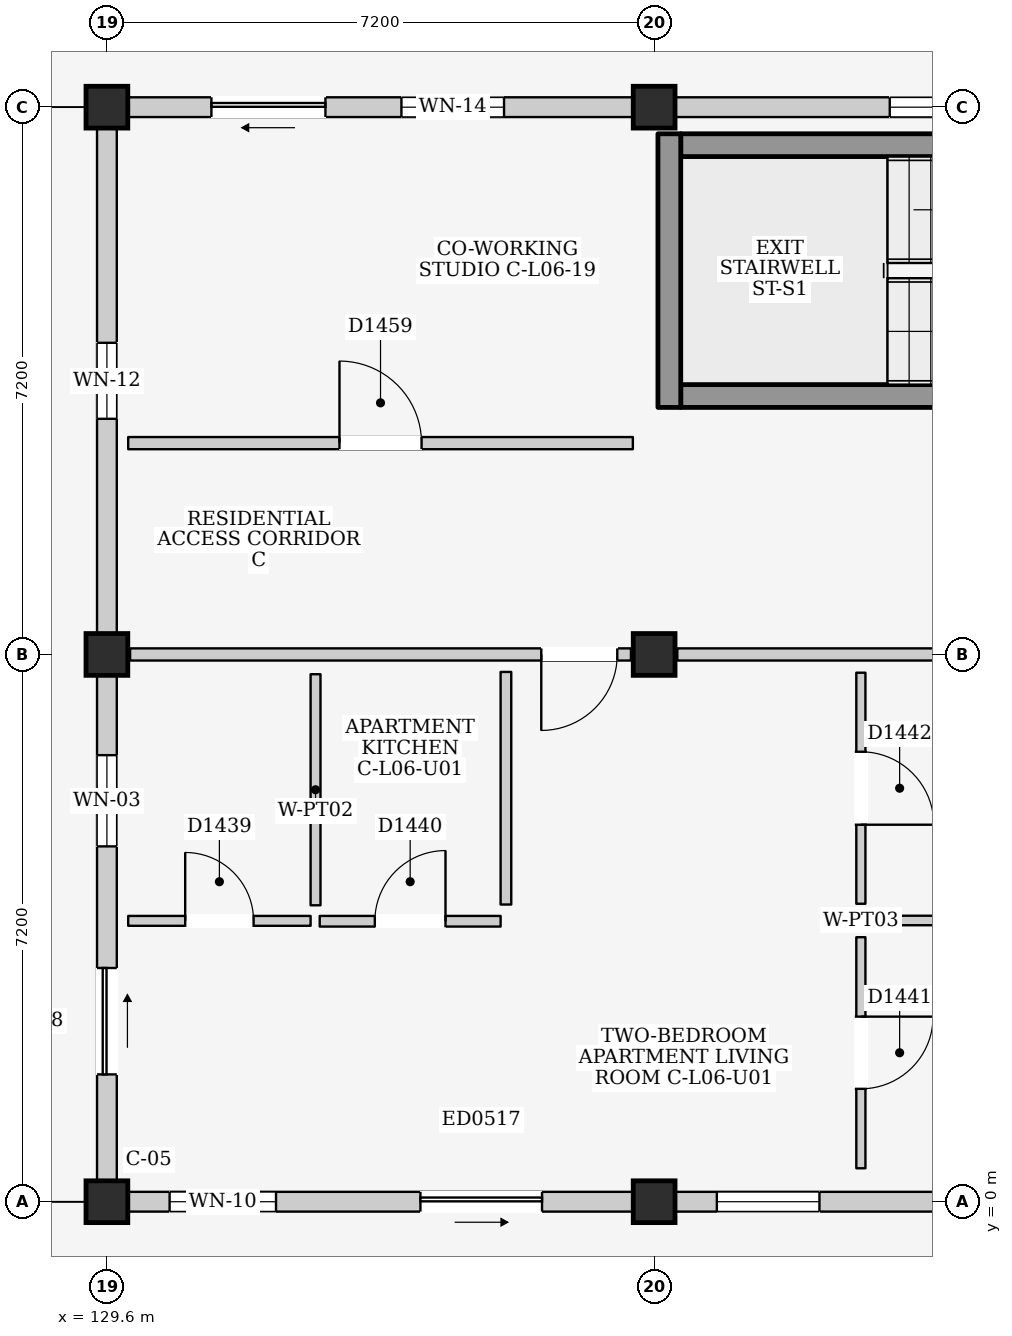
"""IFC4 building model, lengths in metres.
Left out: names, types, materials, properties, quantities, classifications, styles, units other than length and angle.
Written with IfcOpenShell. Run it as: python <this file> out.ifc"""

import sys

from ifc_helpers import new_model, si_unit, direction, frame, frame_2d, origin, origin_2d, place, context, subcontext, project, spatial, rectangle, extrude, element, fill, save


model = new_model("IFC4")
c1 = context("Model", 3, precision=1e-05, world=origin(), true_north=direction((0.0, 1.0)))
c2 = subcontext(c1, "Body", "Model", "MODEL_VIEW")
j1 = project(units=[si_unit("LENGTHUNIT", "METRE"), si_unit("PLANEANGLEUNIT", "RADIAN")], contexts=[c1])
p1 = place(None, origin())
s1 = spatial("IfcSite", under=j1, at=p1, CompositionType="ELEMENT")
p2 = place(p1, origin())
s2 = spatial("IfcBuilding", under=s1, at=p2, CompositionType="ELEMENT")
p3 = place(p2, frame((0.0, 0.0, 21.9)))
s3 = spatial("IfcBuildingStorey", under=s2, at=p3, CompositionType="ELEMENT", Elevation=21.9)
for number, where, z_axis, x_axis in (
    (1, (129.6, 0.0, 0.0), (0.0, 0.0, 1.0), (1.0, 0.0, 0.0)),
    (2, (129.6, 7.2, 0.0), (0.0, 0.0, 1.0), (1.0, 0.0, 0.0)),
    (3, (129.6, 14.4, 0.0), (0.0, 0.0, 1.0), (1.0, 0.0, 0.0)),
    (4, (136.8, 0.0, 0.0), (0.0, 0.0, 1.0), (1.0, 0.0, 0.0)),
    (5, (136.8, 7.2, 0.0), (0.0, 0.0, 1.0), (1.0, 0.0, 0.0)),
    (6, (136.8, 14.4, 0.0), (0.0, 0.0, 1.0), (1.0, 0.0, 0.0)),
):
    element("IfcColumn", number, at=place(p3, frame(where, z_axis=z_axis, x_axis=x_axis)), inside=s3, PredefinedType="COLUMN", context=c2, shape_type="SweptSolid", body=[
        extrude(rectangle(XDim=0.55, YDim=0.55, at=origin_2d()), origin(), (0.0, 0.0, 1.0), 3.2),
    ])
p4 = place(p3, frame((129.875, 0.0, 0.0), z_axis=(0.0, 0.0, 1.0), x_axis=(1.0, 0.0, 0.0)))
e7 = element("IfcWall", 7, at=p4, inside=s3, PredefinedType="ELEMENTEDWALL", context=c2, shape_type="SweptSolid", body=[
    extrude(rectangle(XDim=6.65, YDim=0.26, at=frame_2d((3.325, 0.0))), origin(), (0.0, 0.0, 1.0), 2.515),
])
p5 = place(p4, frame((3.85, 0.0, 0.0)))
e8 = element("IfcOpeningElement", 8, at=p5, cuts=e7, PredefinedType="OPENING", context=c2, shape_type="SweptSolid", body=[
    extrude(rectangle(XDim=1.6, YDim=2.12, at=frame_2d((0.8, 1.06))), frame((0.0, 0.145, 0.0), z_axis=(0.0, -1.0, 0.0), x_axis=(1.0, 0.0, 0.0)), (0.0, 0.0, 1.0), 0.29),
])
p6 = place(p4, frame((0.55, 0.0, 0.9)))
e9 = element("IfcOpeningElement", 9, at=p6, cuts=e7, PredefinedType="OPENING", context=c2, shape_type="SweptSolid", body=[
    extrude(rectangle(XDim=1.4, YDim=1.2, at=frame_2d((0.7, 0.6))), frame((0.0, 0.145, 0.0), z_axis=(0.0, -1.0, 0.0), x_axis=(1.0, 0.0, 0.0)), (0.0, 0.0, 1.0), 0.29),
])
p7 = place(p3, frame((129.6, 0.275, 0.0), z_axis=(0.0, 0.0, 1.0), x_axis=(0.0, 1.0, 0.0)))
e10 = element("IfcWall", 10, at=p7, inside=s3, PredefinedType="ELEMENTEDWALL", context=c2, shape_type="SweptSolid", body=[
    extrude(rectangle(XDim=6.65, YDim=0.26, at=frame_2d((3.325, 0.0))), origin(), (0.0, 0.0, 1.0), 2.465),
])
p8 = place(p7, frame((1.4, 0.0, 0.0)))
e11 = element("IfcOpeningElement", 11, at=p8, cuts=e10, PredefinedType="OPENING", context=c2, shape_type="SweptSolid", body=[
    extrude(rectangle(XDim=1.4, YDim=2.1, at=frame_2d((0.7, 1.05))), frame((0.0, 0.145, 0.0), z_axis=(0.0, -1.0, 0.0), x_axis=(1.0, 0.0, 0.0)), (0.0, 0.0, 1.0), 0.29),
])
p9 = place(p7, frame((4.4, 0.0, 0.95)))
e12 = element("IfcOpeningElement", 12, at=p9, cuts=e10, PredefinedType="OPENING", context=c2, shape_type="SweptSolid", body=[
    extrude(rectangle(XDim=1.2, YDim=1.35, at=frame_2d((0.6, 0.675))), frame((0.0, 0.145, 0.0), z_axis=(0.0, -1.0, 0.0), x_axis=(1.0, 0.0, 0.0)), (0.0, 0.0, 1.0), 0.29),
])
p10 = place(p3, frame((129.875, 14.4, 0.0), z_axis=(0.0, 0.0, 1.0), x_axis=(1.0, 0.0, 0.0)))
e13 = element("IfcWall", 13, at=p10, inside=s3, PredefinedType="ELEMENTEDWALL", context=c2, shape_type="SweptSolid", body=[
    extrude(rectangle(XDim=6.65, YDim=0.26, at=frame_2d((3.325, 0.0))), origin(), (0.0, 0.0, 1.0), 2.365),
])
p11 = place(p10, frame((1.1, 0.0, 0.0)))
e14 = element("IfcOpeningElement", 14, at=p11, cuts=e13, PredefinedType="OPENING", context=c2, shape_type="SweptSolid", body=[
    extrude(rectangle(XDim=1.5, YDim=2.12, at=frame_2d((0.75, 1.06))), frame((0.0, 0.145, 0.0), z_axis=(0.0, -1.0, 0.0), x_axis=(1.0, 0.0, 0.0)), (0.0, 0.0, 1.0), 0.29),
])
p12 = place(p10, frame((3.6, 0.0, 0.755)))
e15 = element("IfcOpeningElement", 15, at=p12, cuts=e13, PredefinedType="OPENING", context=c2, shape_type="SweptSolid", body=[
    extrude(rectangle(XDim=1.35, YDim=1.5, at=frame_2d((0.675, 0.75))), frame((0.0, 0.145, 0.0), z_axis=(0.0, -1.0, 0.0), x_axis=(1.0, 0.0, 0.0)), (0.0, 0.0, 1.0), 0.29),
])
p13 = place(p3, frame((129.6, 7.475, 0.0), z_axis=(0.0, 0.0, 1.0), x_axis=(0.0, 1.0, 0.0)))
e16 = element("IfcWall", 16, at=p13, inside=s3, PredefinedType="ELEMENTEDWALL", context=c2, shape_type="SweptSolid", body=[
    extrude(rectangle(XDim=6.65, YDim=0.26, at=frame_2d((3.325, 0.0))), origin(), (0.0, 0.0, 1.0), 2.465),
])
p14 = place(p13, frame((2.825, 0.0, 1.1)))
e17 = element("IfcOpeningElement", 17, at=p14, cuts=e16, PredefinedType="OPENING", context=c2, shape_type="SweptSolid", body=[
    extrude(rectangle(XDim=1.0, YDim=0.9, at=frame_2d((0.5, 0.45))), frame((0.0, 0.145, 0.0), z_axis=(0.0, -1.0, 0.0), x_axis=(1.0, 0.0, 0.0)), (0.0, 0.0, 1.0), 0.29),
])
p15 = place(p3, frame((137.075, 0.0, 0.0), z_axis=(0.0, 0.0, 1.0), x_axis=(1.0, 0.0, 0.0)))
e18 = element("IfcWall", 18, at=p15, inside=s3, PredefinedType="ELEMENTEDWALL", context=c2, shape_type="SweptSolid", body=[
    extrude(rectangle(XDim=6.65, YDim=0.26, at=frame_2d((3.325, 0.0))), origin(), (0.0, 0.0, 1.0), 2.515),
])
p16 = place(p15, frame((3.85, 0.0, 0.0)))
e19 = element("IfcOpeningElement", 19, at=p16, cuts=e18, PredefinedType="OPENING", context=c2, shape_type="SweptSolid", body=[
    extrude(rectangle(XDim=1.5, YDim=2.12, at=frame_2d((0.75, 1.06))), frame((0.0, 0.145, 0.0), z_axis=(0.0, -1.0, 0.0), x_axis=(1.0, 0.0, 0.0)), (0.0, 0.0, 1.0), 0.29),
])
p17 = place(p15, frame((0.55, 0.0, 0.9)))
e20 = element("IfcOpeningElement", 20, at=p17, cuts=e18, PredefinedType="OPENING", context=c2, shape_type="SweptSolid", body=[
    extrude(rectangle(XDim=1.35, YDim=1.5, at=frame_2d((0.675, 0.75))), frame((0.0, 0.145, 0.0), z_axis=(0.0, -1.0, 0.0), x_axis=(1.0, 0.0, 0.0)), (0.0, 0.0, 1.0), 0.29),
])
p18 = place(p3, frame((137.075, 14.4, 0.0), z_axis=(0.0, 0.0, 1.0), x_axis=(1.0, 0.0, 0.0)))
e21 = element("IfcWall", 21, at=p18, inside=s3, PredefinedType="ELEMENTEDWALL", context=c2, shape_type="SweptSolid", body=[
    extrude(rectangle(XDim=6.65, YDim=0.26, at=frame_2d((3.325, 0.0))), origin(), (0.0, 0.0, 1.0), 2.365),
])
p19 = place(p18, frame((2.825, 0.0, 1.2)))
e22 = element("IfcOpeningElement", 22, at=p19, cuts=e21, PredefinedType="OPENING", context=c2, shape_type="SweptSolid", body=[
    extrude(rectangle(XDim=1.0, YDim=0.9, at=frame_2d((0.5, 0.45))), frame((0.0, 0.145, 0.0), z_axis=(0.0, -1.0, 0.0), x_axis=(1.0, 0.0, 0.0)), (0.0, 0.0, 1.0), 0.29),
])
p20 = place(p3, frame((137.15, 10.6, 0.0), z_axis=(0.0, 0.0, 1.0), x_axis=(1.0, 0.0, 0.0)))
e23 = element("IfcWall", 23, at=p20, inside=s3, PredefinedType="SHEAR", context=c2, shape_type="SweptSolid", body=[
    extrude(rectangle(XDim=6.5, YDim=0.3, at=frame_2d((3.25, 0.0))), origin(), (0.0, 0.0, 1.0), 2.98),
])
p21 = place(p20, frame((5.17, 0.0, 0.0)))
e24 = element("IfcOpeningElement", 24, at=p21, cuts=e23, PredefinedType="OPENING", context=c2, shape_type="SweptSolid", body=[
    extrude(rectangle(XDim=1.15, YDim=2.2, at=frame_2d((0.575, 1.1))), frame((0.0, 0.165, 0.0), z_axis=(0.0, -1.0, 0.0), x_axis=(1.0, 0.0, 0.0)), (0.0, 0.0, 1.0), 0.33),
])
p22 = place(p3, frame((137.15, 13.9, 0.0), z_axis=(0.0, 0.0, 1.0), x_axis=(1.0, 0.0, 0.0)))
e25 = element("IfcWall", 25, at=p22, inside=s3, PredefinedType="SHEAR", context=c2, shape_type="SweptSolid", body=[
    extrude(rectangle(XDim=6.5, YDim=0.3, at=frame_2d((3.25, 0.0))), origin(), (0.0, 0.0, 1.0), 2.98),
])
p23 = place(p3, frame((137.0, 10.45, 0.0), z_axis=(0.0, 0.0, 1.0), x_axis=(0.0, 1.0, 0.0)))
e26 = element("IfcWall", 26, at=p23, inside=s3, PredefinedType="SHEAR", context=c2, shape_type="SweptSolid", body=[
    extrude(rectangle(XDim=3.6, YDim=0.3, at=frame_2d((1.8, 0.0))), origin(), (0.0, 0.0, 1.0), 2.98),
])
p24 = place(p3, frame((129.905, 7.2, 0.0), z_axis=(0.0, 0.0, 1.0), x_axis=(1.0, 0.0, 0.0)))
e27 = element("IfcWall", 27, at=p24, inside=s3, PredefinedType="PARTITIONING", context=c2, shape_type="SweptSolid", body=[
    extrude(rectangle(XDim=6.59, YDim=0.16, at=frame_2d((3.295, 0.0))), origin(), (0.0, 0.0, 1.0), 2.365),
])
p25 = place(p24, frame((5.41, 0.0, 0.0)))
e28 = element("IfcOpeningElement", 28, at=p25, cuts=e27, PredefinedType="OPENING", context=c2, shape_type="SweptSolid", body=[
    extrude(rectangle(XDim=1.0, YDim=2.15, at=frame_2d((0.5, 1.075))), frame((0.0, 0.095, 0.0), z_axis=(0.0, -1.0, 0.0), x_axis=(1.0, 0.0, 0.0)), (0.0, 0.0, 1.0), 0.19),
])
p26 = place(p3, frame((137.105, 7.2, 0.0), z_axis=(0.0, 0.0, 1.0), x_axis=(1.0, 0.0, 0.0)))
e29 = element("IfcWall", 29, at=p26, inside=s3, PredefinedType="PARTITIONING", context=c2, shape_type="SweptSolid", body=[
    extrude(rectangle(XDim=6.59, YDim=0.16, at=frame_2d((3.295, 0.0))), origin(), (0.0, 0.0, 1.0), 2.365),
])
p27 = place(p3, frame((129.88, 3.695, 0.0), z_axis=(0.0, 0.0, 1.0), x_axis=(1.0, 0.0, 0.0)))
e30 = element("IfcWall", 30, at=p27, inside=s3, PredefinedType="PARTITIONING", context=c2, shape_type="SweptSolid", body=[
    extrude(rectangle(XDim=2.4, YDim=0.13, at=frame_2d((1.2, 0.0))), origin(), (0.0, 0.0, 1.0), 2.98),
])
p28 = place(p27, frame((0.75, 0.0, 0.0)))
e31 = element("IfcOpeningElement", 31, at=p28, cuts=e30, PredefinedType="OPENING", context=c2, shape_type="SweptSolid", body=[
    extrude(rectangle(XDim=0.9, YDim=2.1, at=frame_2d((0.45, 1.05))), frame((0.0, 0.08, 0.0), z_axis=(0.0, -1.0, 0.0), x_axis=(1.0, 0.0, 0.0)), (0.0, 0.0, 1.0), 0.16),
])
p29 = place(p3, frame((132.345, 3.9, 0.0), z_axis=(0.0, 0.0, 1.0), x_axis=(0.0, 1.0, 0.0)))
e32 = element("IfcWall", 32, at=p29, inside=s3, PredefinedType="PARTITIONING", context=c2, shape_type="SweptSolid", body=[
    extrude(rectangle(XDim=3.04, YDim=0.13, at=frame_2d((1.52, 0.0))), origin(), (0.0, 0.0, 1.0), 2.98),
])
p30 = place(p3, frame((132.4, 3.69, 0.0), z_axis=(0.0, 0.0, 1.0), x_axis=(1.0, 0.0, 0.0)))
e33 = element("IfcWall", 33, at=p30, inside=s3, PredefinedType="PARTITIONING", context=c2, shape_type="SweptSolid", body=[
    extrude(rectangle(XDim=2.38, YDim=0.14, at=frame_2d((1.19, 0.0))), origin(), (0.0, 0.0, 1.0), 2.98),
])
p31 = place(p30, frame((0.725, 0.0, 0.0)))
e34 = element("IfcOpeningElement", 34, at=p31, cuts=e33, PredefinedType="OPENING", context=c2, shape_type="SweptSolid", body=[
    extrude(rectangle(XDim=0.93, YDim=2.14, at=frame_2d((0.465, 1.07))), frame((0.0, 0.085, 0.0), z_axis=(0.0, -1.0, 0.0), x_axis=(1.0, 0.0, 0.0)), (0.0, 0.0, 1.0), 0.17),
])
p32 = place(p3, frame((134.85, 3.91, 0.0), z_axis=(0.0, 0.0, 1.0), x_axis=(0.0, 1.0, 0.0)))
e35 = element("IfcWall", 35, at=p32, inside=s3, PredefinedType="PARTITIONING", context=c2, shape_type="SweptSolid", body=[
    extrude(rectangle(XDim=3.06, YDim=0.14, at=frame_2d((1.53, 0.0))), origin(), (0.0, 0.0, 1.0), 2.98),
])
p33 = place(p3, frame((139.52, 0.44, 0.0), z_axis=(0.0, 0.0, 1.0), x_axis=(0.0, 1.0, 0.0)))
e36 = element("IfcWall", 36, at=p33, inside=s3, PredefinedType="PARTITIONING", context=c2, shape_type="SweptSolid", body=[
    extrude(rectangle(XDim=3.04, YDim=0.12, at=frame_2d((1.52, 0.0))), origin(), (0.0, 0.0, 1.0), 2.98),
])
p34 = place(p33, frame((1.045, 0.0, 0.0)))
e37 = element("IfcOpeningElement", 37, at=p34, cuts=e36, PredefinedType="OPENING", context=c2, shape_type="SweptSolid", body=[
    extrude(rectangle(XDim=0.95, YDim=2.15, at=frame_2d((0.475, 1.075))), frame((0.0, 0.075, 0.0), z_axis=(0.0, -1.0, 0.0), x_axis=(1.0, 0.0, 0.0)), (0.0, 0.0, 1.0), 0.15),
])
p35 = place(p3, frame((139.72, 3.7, 0.0), z_axis=(0.0, 0.0, 1.0), x_axis=(1.0, 0.0, 0.0)))
e38 = element("IfcWall", 38, at=p35, inside=s3, PredefinedType="PARTITIONING", context=c2, shape_type="SweptSolid", body=[
    extrude(rectangle(XDim=4.06, YDim=0.125, at=frame_2d((2.03, 0.0))), origin(), (0.0, 0.0, 1.0), 2.98),
])
p36 = place(p3, frame((139.52, 3.92, 0.0), z_axis=(0.0, 0.0, 1.0), x_axis=(0.0, 1.0, 0.0)))
e39 = element("IfcWall", 39, at=p36, inside=s3, PredefinedType="PARTITIONING", context=c2, shape_type="SweptSolid", body=[
    extrude(rectangle(XDim=3.04, YDim=0.12, at=frame_2d((1.52, 0.0))), origin(), (0.0, 0.0, 1.0), 2.98),
])
p37 = place(p36, frame((1.04, 0.0, 0.0)))
e40 = element("IfcOpeningElement", 40, at=p37, cuts=e39, PredefinedType="OPENING", context=c2, shape_type="SweptSolid", body=[
    extrude(rectangle(XDim=0.96, YDim=2.15, at=frame_2d((0.48, 1.075))), frame((0.0, 0.075, 0.0), z_axis=(0.0, -1.0, 0.0), x_axis=(1.0, 0.0, 0.0)), (0.0, 0.0, 1.0), 0.15),
])
p38 = place(p3, frame((129.88, 9.98, 0.0), z_axis=(0.0, 0.0, 1.0), x_axis=(1.0, 0.0, 0.0)))
e41 = element("IfcWall", 41, at=p38, inside=s3, PredefinedType="PARTITIONING", context=c2, shape_type="SweptSolid", body=[
    extrude(rectangle(XDim=6.64, YDim=0.16, at=frame_2d((3.32, 0.0))), origin(), (0.0, 0.0, 1.0), 2.98),
])
p39 = place(p38, frame((2.78, 0.0, 0.0)))
e42 = element("IfcOpeningElement", 42, at=p39, cuts=e41, PredefinedType="OPENING", context=c2, shape_type="SweptSolid", body=[
    extrude(rectangle(XDim=1.08, YDim=2.22, at=frame_2d((0.54, 1.11))), frame((0.0, 0.095, 0.0), z_axis=(0.0, -1.0, 0.0), x_axis=(1.0, 0.0, 0.0)), (0.0, 0.0, 1.0), 0.19),
])
p40 = place(p5, frame((1.6, 0.0, 0.0), z_axis=(0.0, 0.0, 1.0), x_axis=(-1.0, 0.0, 0.0)))
e43 = element("IfcDoor", 43, at=p40, inside=s3, OperationType="SLIDING_TO_RIGHT", PredefinedType="DOOR", context=c2, shape_type="SweptSolid", body=[
    extrude(rectangle(XDim=1.6, YDim=2.12, at=frame_2d((0.8, 1.06))), frame((0.0, 0.025, 0.0), z_axis=(0.0, -1.0, 0.0), x_axis=(1.0, 0.0, 0.0)), (0.0, 0.0, 1.0), 0.05),
])
fill(e8, e43)
p41 = place(p6, origin())
e44 = element("IfcWindow", 44, at=p41, inside=s3, PartitioningType="DOUBLE_PANEL_HORIZONTAL", PredefinedType="WINDOW", context=c2, shape_type="SweptSolid", body=[
    extrude(rectangle(XDim=1.4, YDim=1.2, at=frame_2d((0.7, 0.6))), frame((0.0, 0.03, 0.0), z_axis=(0.0, -1.0, 0.0), x_axis=(1.0, 0.0, 0.0)), (0.0, 0.0, 1.0), 0.06),
])
fill(e9, e44)
p42 = place(p8, frame((1.4, 0.0, 0.0), z_axis=(0.0, 0.0, 1.0), x_axis=(-1.0, 0.0, 0.0)))
e45 = element("IfcDoor", 45, at=p42, inside=s3, OperationType="SLIDING_TO_RIGHT", PredefinedType="DOOR", context=c2, shape_type="SweptSolid", body=[
    extrude(rectangle(XDim=1.4, YDim=2.1, at=frame_2d((0.7, 1.05))), frame((0.0, 0.025, 0.0), z_axis=(0.0, -1.0, 0.0), x_axis=(1.0, 0.0, 0.0)), (0.0, 0.0, 1.0), 0.05),
])
fill(e11, e45)
p43 = place(p9, origin())
e46 = element("IfcWindow", 46, at=p43, inside=s3, PartitioningType="SINGLE_PANEL", PredefinedType="WINDOW", context=c2, shape_type="SweptSolid", body=[
    extrude(rectangle(XDim=1.2, YDim=1.35, at=frame_2d((0.6, 0.675))), frame((0.0, 0.03, 0.0), z_axis=(0.0, -1.0, 0.0), x_axis=(1.0, 0.0, 0.0)), (0.0, 0.0, 1.0), 0.06),
])
fill(e12, e46)
p44 = place(p11, frame((1.5, 0.0, 0.0), z_axis=(0.0, 0.0, 1.0), x_axis=(-1.0, 0.0, 0.0)))
e47 = element("IfcDoor", 47, at=p44, inside=s3, OperationType="SLIDING_TO_LEFT", PredefinedType="DOOR", context=c2, shape_type="SweptSolid", body=[
    extrude(rectangle(XDim=1.5, YDim=2.12, at=frame_2d((0.75, 1.06))), frame((0.0, 0.025, 0.0), z_axis=(0.0, -1.0, 0.0), x_axis=(1.0, 0.0, 0.0)), (0.0, 0.0, 1.0), 0.05),
])
fill(e14, e47)
p45 = place(p12, origin())
e48 = element("IfcWindow", 48, at=p45, inside=s3, PartitioningType="SINGLE_PANEL", PredefinedType="WINDOW", context=c2, shape_type="SweptSolid", body=[
    extrude(rectangle(XDim=1.35, YDim=1.5, at=frame_2d((0.675, 0.75))), frame((0.0, 0.03, 0.0), z_axis=(0.0, -1.0, 0.0), x_axis=(1.0, 0.0, 0.0)), (0.0, 0.0, 1.0), 0.06),
])
fill(e15, e48)
p46 = place(p14, origin())
e49 = element("IfcWindow", 49, at=p46, inside=s3, PartitioningType="SINGLE_PANEL", PredefinedType="WINDOW", context=c2, shape_type="SweptSolid", body=[
    extrude(rectangle(XDim=1.0, YDim=0.9, at=frame_2d((0.5, 0.45))), frame((0.0, 0.03, 0.0), z_axis=(0.0, -1.0, 0.0), x_axis=(1.0, 0.0, 0.0)), (0.0, 0.0, 1.0), 0.06),
])
fill(e17, e49)
p47 = place(p17, origin())
e50 = element("IfcWindow", 50, at=p47, inside=s3, PartitioningType="SINGLE_PANEL", PredefinedType="WINDOW", context=c2, shape_type="SweptSolid", body=[
    extrude(rectangle(XDim=1.35, YDim=1.5, at=frame_2d((0.675, 0.75))), frame((0.0, 0.03, 0.0), z_axis=(0.0, -1.0, 0.0), x_axis=(1.0, 0.0, 0.0)), (0.0, 0.0, 1.0), 0.06),
])
fill(e20, e50)
p48 = place(p19, origin())
e51 = element("IfcWindow", 51, at=p48, inside=s3, PartitioningType="SINGLE_PANEL", PredefinedType="WINDOW", context=c2, shape_type="SweptSolid", body=[
    extrude(rectangle(XDim=1.0, YDim=0.9, at=frame_2d((0.5, 0.45))), frame((0.0, 0.03, 0.0), z_axis=(0.0, -1.0, 0.0), x_axis=(1.0, 0.0, 0.0)), (0.0, 0.0, 1.0), 0.06),
])
fill(e22, e51)
p49 = place(p25, frame((1.0, 0.0, 0.0), z_axis=(0.0, 0.0, 1.0), x_axis=(-1.0, 0.0, 0.0)))
e52 = element("IfcDoor", 52, at=p49, inside=s3, OperationType="SINGLE_SWING_RIGHT", PredefinedType="DOOR", context=c2, shape_type="SweptSolid", body=[
    extrude(rectangle(XDim=1.0, YDim=2.15, at=frame_2d((0.5, 1.075))), frame((0.0, 0.025, 0.0), z_axis=(0.0, -1.0, 0.0), x_axis=(1.0, 0.0, 0.0)), (0.0, 0.0, 1.0), 0.05),
])
fill(e28, e52)
p50 = place(p28, origin())
e53 = element("IfcDoor", 53, at=p50, inside=s3, OperationType="SINGLE_SWING_LEFT", PredefinedType="DOOR", context=c2, shape_type="SweptSolid", body=[
    extrude(rectangle(XDim=0.9, YDim=2.1, at=frame_2d((0.45, 1.05))), frame((0.0, 0.025, 0.0), z_axis=(0.0, -1.0, 0.0), x_axis=(1.0, 0.0, 0.0)), (0.0, 0.0, 1.0), 0.05),
])
fill(e31, e53)
p51 = place(p31, origin())
e54 = element("IfcDoor", 54, at=p51, inside=s3, OperationType="SINGLE_SWING_RIGHT", PredefinedType="DOOR", context=c2, shape_type="SweptSolid", body=[
    extrude(rectangle(XDim=0.93, YDim=2.14, at=frame_2d((0.465, 1.07))), frame((0.0, 0.025, 0.0), z_axis=(0.0, -1.0, 0.0), x_axis=(1.0, 0.0, 0.0)), (0.0, 0.0, 1.0), 0.05),
])
fill(e34, e54)
p52 = place(p34, frame((0.95, 0.0, 0.0), z_axis=(0.0, 0.0, 1.0), x_axis=(-1.0, 0.0, 0.0)))
e55 = element("IfcDoor", 55, at=p52, inside=s3, OperationType="SINGLE_SWING_LEFT", PredefinedType="DOOR", context=c2, shape_type="SweptSolid", body=[
    extrude(rectangle(XDim=0.95, YDim=2.15, at=frame_2d((0.475, 1.075))), frame((0.0, 0.025, 0.0), z_axis=(0.0, -1.0, 0.0), x_axis=(1.0, 0.0, 0.0)), (0.0, 0.0, 1.0), 0.05),
])
fill(e37, e55)
p53 = place(p37, frame((0.96, 0.0, 0.0), z_axis=(0.0, 0.0, 1.0), x_axis=(-1.0, 0.0, 0.0)))
e56 = element("IfcDoor", 56, at=p53, inside=s3, OperationType="SINGLE_SWING_RIGHT", PredefinedType="DOOR", context=c2, shape_type="SweptSolid", body=[
    extrude(rectangle(XDim=0.96, YDim=2.15, at=frame_2d((0.48, 1.075))), frame((0.0, 0.025, 0.0), z_axis=(0.0, -1.0, 0.0), x_axis=(1.0, 0.0, 0.0)), (0.0, 0.0, 1.0), 0.05),
])
fill(e40, e56)
p54 = place(p39, origin())
e57 = element("IfcDoor", 57, at=p54, inside=s3, OperationType="SINGLE_SWING_LEFT", PredefinedType="DOOR", context=c2, shape_type="SweptSolid", body=[
    extrude(rectangle(XDim=1.08, YDim=2.22, at=frame_2d((0.54, 1.11))), frame((0.0, 0.025, 0.0), z_axis=(0.0, -1.0, 0.0), x_axis=(1.0, 0.0, 0.0)), (0.0, 0.0, 1.0), 0.05),
])
fill(e42, e57)
save(model, sys.argv[1])
